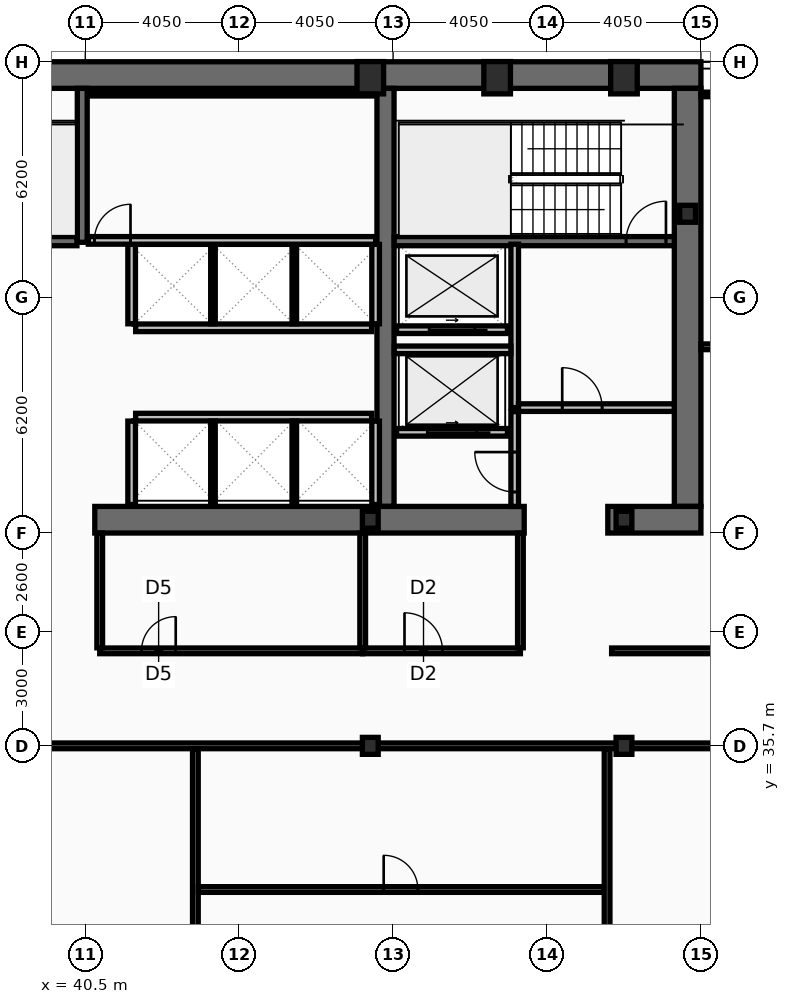
"""IFC4 building model, lengths in metres.
Left out: names, types, materials, properties, quantities, classifications, styles, units other than length and angle.
Written with IfcOpenShell. Run it as: python <this file> out.ifc"""

import sys

from ifc_helpers import new_model, si_unit, direction, frame, frame_2d, origin, origin_2d, place, context, subcontext, project, spatial, rectangle, hollow_rectangle, i_section, extrude, element, fill, save


model = new_model("IFC4")
c1 = context("Model", 3, precision=1e-05, world=origin(), true_north=direction((0.0, 1.0)))
c2 = subcontext(c1, "Body", "Model", "MODEL_VIEW")
j1 = project(units=[si_unit("LENGTHUNIT", "METRE"), si_unit("PLANEANGLEUNIT", "RADIAN")], contexts=[c1])
p1 = place(None, origin())
s1 = spatial("IfcSite", under=j1, at=p1, CompositionType="ELEMENT")
p2 = place(p1, origin())
s2 = spatial("IfcBuilding", under=s1, at=p2, CompositionType="ELEMENT")
p3 = place(p2, frame((0.0, 0.0, 143.4)))
s3 = spatial("IfcBuildingStorey", under=s2, at=p3, CompositionType="ELEMENT", Elevation=143.4)
p4 = place(p3, frame((16.2, 53.35, 0.0), z_axis=(0.0, 0.0, 1.0), x_axis=(1.0, 0.0, 0.0)))
e1 = element("IfcWall", 1, at=p4, inside=s3, PredefinedType="SHEAR", context=c2, shape_type="SweptSolid", body=[
    extrude(rectangle(XDim=40.5, YDim=0.7, at=frame_2d((20.25, 0.0))), origin(), (0.0, 0.0, 1.0), 3.44),
])
p5 = place(p3, frame((56.35, 53.0, 0.0), z_axis=(0.0, 0.0, 1.0), x_axis=(0.0, -1.0, 0.0)))
e2 = element("IfcWall", 2, at=p5, inside=s3, PredefinedType="SHEAR", context=c2, shape_type="SweptSolid", body=[
    extrude(rectangle(XDim=11.0, YDim=0.7, at=frame_2d((5.5, 0.0))), origin(), (0.0, 0.0, 1.0), 3.44),
])
p6 = place(p3, frame((48.4, 42.0, 0.0), z_axis=(0.0, 0.0, 1.0), x_axis=(0.0, 1.0, 0.0)))
e3 = element("IfcWall", 3, at=p6, inside=s3, PredefinedType="SHEAR", context=c2, shape_type="SweptSolid", body=[
    extrude(rectangle(XDim=11.0, YDim=0.45, at=frame_2d((5.5, 0.0))), origin(), (0.0, 0.0, 1.0), 3.44),
])
p7 = place(p3, frame((52.05, 41.65, 0.0), z_axis=(0.0, 0.0, 1.0), x_axis=(-1.0, 0.0, 0.0)))
e4 = element("IfcWall", 4, at=p7, inside=s3, PredefinedType="SHEAR", context=c2, shape_type="SweptSolid", body=[
    extrude(rectangle(XDim=11.3, YDim=0.7, at=frame_2d((5.65, 0.0))), origin(), (0.0, 0.0, 1.0), 3.44),
])
p8 = place(p3, frame((56.7, 41.65, 0.0), z_axis=(0.0, 0.0, 1.0), x_axis=(-1.0, 0.0, 0.0)))
e5 = element("IfcWall", 5, at=p8, inside=s3, PredefinedType="SHEAR", context=c2, shape_type="SweptSolid", body=[
    extrude(rectangle(XDim=2.45, YDim=0.7, at=frame_2d((1.225, 0.0))), origin(), (0.0, 0.0, 1.0), 3.44),
])
p9 = place(p3, frame((40.42, 48.95, 0.0), z_axis=(0.0, 0.0, 1.0), x_axis=(0.0, 1.0, 0.0)))
e6 = element("IfcWall", 6, at=p9, inside=s3, PredefinedType="SHEAR", context=c2, shape_type="SweptSolid", body=[
    extrude(rectangle(XDim=4.05, YDim=0.26, at=frame_2d((2.025, 0.0))), origin(), (0.0, 0.0, 1.0), 3.44),
])
p10 = place(p3, frame((48.63, 48.98, 0.0), z_axis=(0.0, 0.0, 1.0), x_axis=(1.0, 0.0, 0.0)))
e7 = element("IfcWall", 7, at=p10, inside=s3, PredefinedType="SHEAR", context=c2, shape_type="SweptSolid", body=[
    extrude(rectangle(XDim=7.37, YDim=0.24, at=frame_2d((3.685, 0.0))), origin(), (0.0, 0.0, 1.0), 3.44),
])
p11 = place(p10, frame((6.1, 0.0, 0.0)))
e8 = element("IfcOpeningElement", 8, at=p11, cuts=e7, PredefinedType="OPENING", context=c2, shape_type="SweptSolid", body=[
    extrude(rectangle(XDim=1.05, YDim=2.15, at=frame_2d((0.525, 1.075))), frame((0.0, 0.13, 0.0), z_axis=(0.0, -1.0, 0.0), x_axis=(1.0, 0.0, 0.0)), (0.0, 0.0, 1.0), 0.26),
])
p12 = place(p3, frame((32.72, 48.98, 0.0), z_axis=(0.0, 0.0, 1.0), x_axis=(1.0, 0.0, 0.0)))
e9 = element("IfcWall", 9, at=p12, inside=s3, PredefinedType="SHEAR", context=c2, shape_type="SweptSolid", body=[
    extrude(rectangle(XDim=7.56, YDim=0.24, at=frame_2d((3.78, 0.0))), origin(), (0.0, 0.0, 1.0), 3.44),
])
p13 = place(p12, frame((0.22, 0.0, 0.0)))
e10 = element("IfcOpeningElement", 10, at=p13, cuts=e9, PredefinedType="OPENING", context=c2, shape_type="SweptSolid", body=[
    extrude(rectangle(XDim=1.05, YDim=2.15, at=frame_2d((0.525, 1.075))), frame((0.0, 0.13, 0.0), z_axis=(0.0, -1.0, 0.0), x_axis=(1.0, 0.0, 0.0)), (0.0, 0.0, 1.0), 0.26),
])
for number, where, z_axis, x_axis in (
    (11, (48.0, 53.28, 0.0), (0.0, 0.0, 1.0), (1.0, 0.0, 0.0)),
    (12, (51.337, 53.28, 0.0), (0.0, 0.0, 1.0), (1.0, 0.0, 0.0)),
    (13, (54.675, 53.28, 0.0), (0.0, 0.0, 1.0), (1.0, 0.0, 0.0)),
):
    element("IfcColumn", number, at=place(p3, frame(where, z_axis=z_axis, x_axis=x_axis)), inside=s3, PredefinedType="COLUMN", context=c2, shape_type="SweptSolid", body=[
        extrude(hollow_rectangle(XDim=0.7, YDim=0.85, WallThickness=0.05, at=origin_2d()), origin(), (0.0, 0.0, 1.0), 3.6),
    ])
for number, where, z_axis, x_axis in (
    (14, (56.35, 49.7, 0.0), (0.0, 0.0, 1.0), (1.0, 0.0, 0.0)),
    (15, (48.0, 35.7, 0.0), (0.0, 0.0, 1.0), (1.0, 0.0, 0.0)),
    (16, (48.0, 41.65, 0.0), (0.0, 0.0, 1.0), (1.0, 0.0, 0.0)),
    (17, (54.675, 35.7, 0.0), (0.0, 0.0, 1.0), (1.0, 0.0, 0.0)),
    (18, (54.675, 41.65, 0.0), (0.0, 0.0, 1.0), (1.0, 0.0, 0.0)),
):
    element("IfcColumn", number, at=place(p3, frame(where, z_axis=z_axis, x_axis=x_axis)), inside=s3, PredefinedType="COLUMN", context=c2, shape_type="SweptSolid", body=[
        extrude(i_section(OverallWidth=0.416, OverallDepth=0.446, WebThickness=0.039, FlangeThickness=0.063, at=origin_2d()), origin(), (0.0, 0.0, 1.0), 3.6),
    ])
p14 = place(p3, frame((51.61, 43.95, 0.0), z_axis=(0.0, 0.0, 1.0), x_axis=(-1.0, 0.0, 0.0)))
e19 = element("IfcWall", 19, at=p14, inside=s3, PredefinedType="PARTITIONING", context=c2, shape_type="SweptSolid", body=[
    extrude(rectangle(XDim=2.92, YDim=0.2, at=frame_2d((1.46, 0.0))), origin(), (0.0, 0.0, 1.0), 3.44),
])
p15 = place(p14, frame((0.81, 0.0, 0.0)))
e20 = element("IfcOpeningElement", 20, at=p15, cuts=e19, PredefinedType="OPENING", context=c2, shape_type="SweptSolid", body=[
    extrude(rectangle(XDim=1.3, YDim=2.18, at=frame_2d((0.65, 1.09))), frame((0.0, 0.11, 0.0), z_axis=(0.0, -1.0, 0.0), x_axis=(1.0, 0.0, 0.0)), (0.0, 0.0, 1.0), 0.22),
])
p16 = place(p3, frame((51.61, 46.65, 0.0), z_axis=(0.0, 0.0, 1.0), x_axis=(-1.0, 0.0, 0.0)))
e21 = element("IfcWall", 21, at=p16, inside=s3, PredefinedType="PARTITIONING", context=c2, shape_type="SweptSolid", body=[
    extrude(rectangle(XDim=2.92, YDim=0.2, at=frame_2d((1.46, 0.0))), origin(), (0.0, 0.0, 1.0), 3.44),
])
p17 = place(p16, frame((0.86, 0.0, 0.0)))
e22 = element("IfcOpeningElement", 22, at=p17, cuts=e21, PredefinedType="OPENING", context=c2, shape_type="SweptSolid", body=[
    extrude(rectangle(XDim=1.2, YDim=2.18, at=frame_2d((0.6, 1.09))), frame((0.0, 0.11, 0.0), z_axis=(0.0, -1.0, 0.0), x_axis=(1.0, 0.0, 0.0)), (0.0, 0.0, 1.0), 0.22),
])
p18 = place(p3, frame((51.8, 44.6, 0.0), z_axis=(0.0, 0.0, 1.0), x_axis=(0.0, 1.0, 0.0)))
e23 = element("IfcWall", 23, at=p18, inside=s3, PredefinedType="PARTITIONING", context=c2, shape_type="SweptSolid", body=[
    extrude(rectangle(XDim=4.3, YDim=0.2, at=frame_2d((2.15, 0.0))), origin(), (0.0, 0.0, 1.0), 3.44),
])
p19 = place(p3, frame((51.9, 44.6, 0.0), z_axis=(0.0, 0.0, 1.0), x_axis=(1.0, 0.0, 0.0)))
e24 = element("IfcWall", 24, at=p19, inside=s3, PredefinedType="PARTITIONING", context=c2, shape_type="SweptSolid", body=[
    extrude(rectangle(XDim=4.1, YDim=0.2, at=frame_2d((2.05, 0.0))), origin(), (0.0, 0.0, 1.0), 3.44),
])
p20 = place(p19, frame((1.15, 0.0, 0.0)))
e25 = element("IfcOpeningElement", 25, at=p20, cuts=e24, PredefinedType="OPENING", context=c2, shape_type="SweptSolid", body=[
    extrude(rectangle(XDim=1.05, YDim=2.15, at=frame_2d((0.525, 1.075))), frame((0.0, 0.11, 0.0), z_axis=(0.0, -1.0, 0.0), x_axis=(1.0, 0.0, 0.0)), (0.0, 0.0, 1.0), 0.22),
])
p21 = place(p3, frame((48.63, 46.12, 0.0), z_axis=(0.0, 0.0, 1.0), x_axis=(1.0, 0.0, 0.0)))
e26 = element("IfcWall", 26, at=p21, inside=s3, PredefinedType="PARTITIONING", context=c2, shape_type="SweptSolid", body=[
    extrude(rectangle(XDim=3.07, YDim=0.2, at=frame_2d((1.535, 0.0))), origin(), (0.0, 0.0, 1.0), 3.44),
])
p22 = place(p3, frame((51.8, 42.0, 0.0), z_axis=(0.0, 0.0, 1.0), x_axis=(0.0, 1.0, 0.0)))
e27 = element("IfcWall", 27, at=p22, inside=s3, PredefinedType="PARTITIONING", context=c2, shape_type="SweptSolid", body=[
    extrude(rectangle(XDim=2.495, YDim=0.2, at=frame_2d((1.248, 0.0))), origin(), (0.0, 0.0, 1.0), 3.44),
])
p23 = place(p22, frame((0.38, 0.0, 0.0)))
e28 = element("IfcOpeningElement", 28, at=p23, cuts=e27, PredefinedType="OPENING", context=c2, shape_type="SweptSolid", body=[
    extrude(rectangle(XDim=1.05, YDim=2.15, at=frame_2d((0.525, 1.075))), frame((0.0, 0.11, 0.0), z_axis=(0.0, -1.0, 0.0), x_axis=(1.0, 0.0, 0.0)), (0.0, 0.0, 1.0), 0.22),
])
p24 = place(p3, frame((41.825, 46.7, 0.0), z_axis=(0.0, 0.0, 1.0), x_axis=(1.0, 0.0, 0.0)))
e29 = element("IfcWall", 29, at=p24, inside=s3, PredefinedType="PARTITIONING", context=c2, shape_type="SweptSolid", body=[
    extrude(rectangle(XDim=6.21, YDim=0.2, at=frame_2d((3.105, 0.0))), origin(), (0.0, 0.0, 1.0), 3.44),
])
for number, where, z_axis, x_axis in (
    (30, (41.72, 46.805, 0.0), (0.0, 0.0, 1.0), (0.0, 1.0, 0.0)),
    (31, (48.14, 46.805, 0.0), (0.0, 0.0, 1.0), (0.0, 1.0, 0.0)),
):
    element("IfcWall", number, at=place(p3, frame(where, z_axis=z_axis, x_axis=x_axis)), inside=s3, PredefinedType="PARTITIONING", context=c2, shape_type="SweptSolid", body=[
        extrude(rectangle(XDim=2.09, YDim=0.2, at=frame_2d((1.045, 0.0))), origin(), (0.0, 0.0, 1.0), 3.44),
    ])
for number, where, z_axis, x_axis in (
    (32, (43.86, 46.805, 0.0), (0.0, 0.0, 1.0), (0.0, 1.0, 0.0)),
    (33, (46.0, 46.805, 0.0), (0.0, 0.0, 1.0), (0.0, 1.0, 0.0)),
):
    element("IfcWall", number, at=place(p3, frame(where, z_axis=z_axis, x_axis=x_axis)), inside=s3, PredefinedType="PARTITIONING", context=c2, shape_type="SweptSolid", body=[
        extrude(rectangle(XDim=2.09, YDim=0.12, at=frame_2d((1.045, 0.0))), origin(), (0.0, 0.0, 1.0), 3.44),
    ])
p25 = place(p3, frame((41.825, 44.35, 0.0), z_axis=(0.0, 0.0, 1.0), x_axis=(1.0, 0.0, 0.0)))
e34 = element("IfcWall", 34, at=p25, inside=s3, PredefinedType="PARTITIONING", context=c2, shape_type="SweptSolid", body=[
    extrude(rectangle(XDim=6.21, YDim=0.2, at=frame_2d((3.105, 0.0))), origin(), (0.0, 0.0, 1.0), 3.44),
])
for number, where, z_axis, x_axis in (
    (35, (41.72, 42.05, 0.0), (0.0, 0.0, 1.0), (0.0, 1.0, 0.0)),
    (36, (48.14, 42.05, 0.0), (0.0, 0.0, 1.0), (0.0, 1.0, 0.0)),
):
    element("IfcWall", number, at=place(p3, frame(where, z_axis=z_axis, x_axis=x_axis)), inside=s3, PredefinedType="PARTITIONING", context=c2, shape_type="SweptSolid", body=[
        extrude(rectangle(XDim=2.195, YDim=0.2, at=frame_2d((1.098, 0.0))), origin(), (0.0, 0.0, 1.0), 3.44),
    ])
for number, where, z_axis, x_axis in (
    (37, (43.86, 42.05, 0.0), (0.0, 0.0, 1.0), (0.0, 1.0, 0.0)),
    (38, (46.0, 42.05, 0.0), (0.0, 0.0, 1.0), (0.0, 1.0, 0.0)),
):
    element("IfcWall", number, at=place(p3, frame(where, z_axis=z_axis, x_axis=x_axis)), inside=s3, PredefinedType="PARTITIONING", context=c2, shape_type="SweptSolid", body=[
        extrude(rectangle(XDim=2.195, YDim=0.12, at=frame_2d((1.098, 0.0))), origin(), (0.0, 0.0, 1.0), 3.44),
    ])
p26 = place(p3, frame((40.58, 52.86, 0.0), z_axis=(0.0, 0.0, 1.0), x_axis=(1.0, 0.0, 0.0)))
e39 = element("IfcWall", 39, at=p26, inside=s3, PredefinedType="PARTITIONING", context=c2, shape_type="SweptSolid", body=[
    extrude(rectangle(XDim=7.56, YDim=0.12, at=frame_2d((3.78, 0.0))), origin(), (0.0, 0.0, 1.0), 3.44),
])
p27 = place(p3, frame((40.58, 49.0, 0.0), z_axis=(0.0, 0.0, 1.0), x_axis=(1.0, 0.0, 0.0)))
e40 = element("IfcWall", 40, at=p27, inside=s3, PredefinedType="PARTITIONING", context=c2, shape_type="SweptSolid", body=[
    extrude(rectangle(XDim=7.56, YDim=0.2, at=frame_2d((3.78, 0.0))), origin(), (0.0, 0.0, 1.0), 3.44),
])
p28 = place(p27, frame((0.16, 0.0, 0.0)))
e41 = element("IfcOpeningElement", 41, at=p28, cuts=e40, PredefinedType="OPENING", context=c2, shape_type="SweptSolid", body=[
    extrude(rectangle(XDim=0.95, YDim=2.1, at=frame_2d((0.475, 1.05))), frame((0.0, 0.11, 0.0), z_axis=(0.0, -1.0, 0.0), x_axis=(1.0, 0.0, 0.0)), (0.0, 0.0, 1.0), 0.22),
])
p29 = place(p3, frame((40.88, 38.2, 0.0), z_axis=(0.0, 0.0, 1.0), x_axis=(1.0, 0.0, 0.0)))
e42 = element("IfcWall", 42, at=p29, inside=s3, PredefinedType="PARTITIONING", context=c2, shape_type="SweptSolid", body=[
    extrude(rectangle(XDim=6.92, YDim=0.15, at=frame_2d((3.46, 0.0))), origin(), (0.0, 0.0, 1.0), 2.73),
])
p30 = place(p29, frame((1.1, 0.0, 0.0)))
e43 = element("IfcOpeningElement", 43, at=p30, cuts=e42, PredefinedType="OPENING", context=c2, shape_type="SweptSolid", body=[
    extrude(rectangle(XDim=0.9, YDim=2.05, at=frame_2d((0.45, 1.025))), frame((0.0, 0.085, 0.0), z_axis=(0.0, -1.0, 0.0), x_axis=(1.0, 0.0, 0.0)), (0.0, 0.0, 1.0), 0.17),
])
p31 = place(p3, frame((47.8, 38.2, 0.0), z_axis=(0.0, 0.0, 1.0), x_axis=(1.0, 0.0, 0.0)))
e44 = element("IfcWall", 44, at=p31, inside=s3, PredefinedType="PARTITIONING", context=c2, shape_type="SweptSolid", body=[
    extrude(rectangle(XDim=4.15, YDim=0.15, at=frame_2d((2.075, 0.0))), origin(), (0.0, 0.0, 1.0), 2.73),
])
p32 = place(p31, frame((1.1, 0.0, 0.0)))
e45 = element("IfcOpeningElement", 45, at=p32, cuts=e44, PredefinedType="OPENING", context=c2, shape_type="SweptSolid", body=[
    extrude(rectangle(XDim=1.0, YDim=2.05, at=frame_2d((0.5, 1.025))), frame((0.0, 0.085, 0.0), z_axis=(0.0, -1.0, 0.0), x_axis=(1.0, 0.0, 0.0)), (0.0, 0.0, 1.0), 0.17),
])
p33 = place(p3, frame((40.88, 38.28, 0.0), z_axis=(0.0, 0.0, 1.0), x_axis=(0.0, 1.0, 0.0)))
e46 = element("IfcWall", 46, at=p33, inside=s3, PredefinedType="PARTITIONING", context=c2, shape_type="SweptSolid", body=[
    extrude(rectangle(XDim=3.02, YDim=0.15, at=frame_2d((1.51, 0.0))), origin(), (0.0, 0.0, 1.0), 3.44),
])
p34 = place(p3, frame((47.8, 38.28, 0.0), z_axis=(0.0, 0.0, 1.0), x_axis=(0.0, 1.0, 0.0)))
e47 = element("IfcWall", 47, at=p34, inside=s3, PredefinedType="PARTITIONING", context=c2, shape_type="SweptSolid", body=[
    extrude(rectangle(XDim=3.02, YDim=0.15, at=frame_2d((1.51, 0.0))), origin(), (0.0, 0.0, 1.0), 2.73),
])
p35 = place(p3, frame((51.95, 38.28, 0.0), z_axis=(0.0, 0.0, 1.0), x_axis=(0.0, 1.0, 0.0)))
e48 = element("IfcWall", 48, at=p35, inside=s3, PredefinedType="PARTITIONING", context=c2, shape_type="SweptSolid", body=[
    extrude(rectangle(XDim=3.02, YDim=0.15, at=frame_2d((1.51, 0.0))), origin(), (0.0, 0.0, 1.0), 3.44),
])
p36 = place(p3, frame((54.35, 38.2, 0.0), z_axis=(0.0, 0.0, 1.0), x_axis=(1.0, 0.0, 0.0)))
e49 = element("IfcWall", 49, at=p36, inside=s3, PredefinedType="PARTITIONING", context=c2, shape_type="SweptSolid", body=[
    extrude(rectangle(XDim=12.52, YDim=0.15, at=frame_2d((6.26, 0.0))), origin(), (0.0, 0.0, 1.0), 2.73),
])
p37 = place(p36, frame((3.25, 0.0, 0.0)))
e50 = element("IfcOpeningElement", 50, at=p37, cuts=e49, PredefinedType="OPENING", context=c2, shape_type="SweptSolid", body=[
    extrude(rectangle(XDim=0.95, YDim=2.05, at=frame_2d((0.475, 1.025))), frame((0.0, 0.085, 0.0), z_axis=(0.0, -1.0, 0.0), x_axis=(1.0, 0.0, 0.0)), (0.0, 0.0, 1.0), 0.17),
])
p38 = place(p3, frame((56.7, 46.2, 0.0), z_axis=(0.0, 0.0, 1.0), x_axis=(1.0, 0.0, 0.0)))
e51 = element("IfcWall", 51, at=p38, inside=s3, PredefinedType="PARTITIONING", context=c2, shape_type="SweptSolid", body=[
    extrude(rectangle(XDim=10.105, YDim=0.15, at=frame_2d((5.052, 0.0))), origin(), (0.0, 0.0, 1.0), 2.83),
])
p39 = place(p38, frame((0.9, 0.0, 0.0)))
e52 = element("IfcOpeningElement", 52, at=p39, cuts=e51, PredefinedType="OPENING", context=c2, shape_type="SweptSolid", body=[
    extrude(rectangle(XDim=0.9, YDim=2.05, at=frame_2d((0.45, 1.025))), frame((0.0, 0.085, 0.0), z_axis=(0.0, -1.0, 0.0), x_axis=(1.0, 0.0, 0.0)), (0.0, 0.0, 1.0), 0.17),
])
p40 = place(p3, frame((21.81, 35.7, 0.0), z_axis=(0.0, 0.0, 1.0), x_axis=(1.0, 0.0, 0.0)))
e53 = element("IfcWall", 53, at=p40, inside=s3, PredefinedType="PARTITIONING", context=c2, shape_type="SweptSolid", body=[
    extrude(rectangle(XDim=44.995, YDim=0.15, at=frame_2d((22.498, 0.0))), origin(), (0.0, 0.0, 1.0), 2.73),
])
p41 = place(p3, frame((43.397, 26.785, 0.0), z_axis=(0.0, 0.0, 1.0), x_axis=(0.0, 1.0, 0.0)))
e54 = element("IfcWall", 54, at=p41, inside=s3, PredefinedType="PARTITIONING", context=c2, shape_type="SweptSolid", body=[
    extrude(rectangle(XDim=8.835, YDim=0.15, at=frame_2d((4.417, 0.0))), origin(), (0.0, 0.0, 1.0), 2.93),
])
p42 = place(p3, frame((43.477, 31.92, 0.0), z_axis=(0.0, 0.0, 1.0), x_axis=(1.0, 0.0, 0.0)))
e55 = element("IfcWall", 55, at=p42, inside=s3, PredefinedType="PARTITIONING", context=c2, shape_type="SweptSolid", body=[
    extrude(rectangle(XDim=10.674, YDim=0.15, at=frame_2d((5.337, 0.0))), origin(), (0.0, 0.0, 1.0), 2.73),
])
p43 = place(p42, frame((4.875, 0.0, 0.0)))
e56 = element("IfcOpeningElement", 56, at=p43, cuts=e55, PredefinedType="OPENING", context=c2, shape_type="SweptSolid", body=[
    extrude(rectangle(XDim=0.9, YDim=2.05, at=frame_2d((0.45, 1.025))), frame((0.0, 0.085, 0.0), z_axis=(0.0, -1.0, 0.0), x_axis=(1.0, 0.0, 0.0)), (0.0, 0.0, 1.0), 0.17),
])
p44 = place(p3, frame((54.231, 26.785, 0.0), z_axis=(0.0, 0.0, 1.0), x_axis=(0.0, 1.0, 0.0)))
e57 = element("IfcWall", 57, at=p44, inside=s3, PredefinedType="PARTITIONING", context=c2, shape_type="SweptSolid", body=[
    extrude(rectangle(XDim=8.835, YDim=0.15, at=frame_2d((4.417, 0.0))), origin(), (0.0, 0.0, 1.0), 2.73),
])
p45 = place(p3, frame((56.7, 52.84, 0.0), z_axis=(0.0, 0.0, 1.0), x_axis=(1.0, 0.0, 0.0)))
e58 = element("IfcWall", 58, at=p45, inside=s3, PredefinedType="PARTITIONING", context=c2, shape_type="SweptSolid", body=[
    extrude(rectangle(XDim=10.105, YDim=0.12, at=frame_2d((5.052, 0.0))), origin(), (0.0, 0.0, 1.0), 3.44),
])
p46 = place(p11, origin())
e59 = element("IfcDoor", 59, at=p46, inside=s3, OperationType="SINGLE_SWING_RIGHT", PredefinedType="DOOR", context=c2, shape_type="SweptSolid", body=[
    extrude(rectangle(XDim=1.05, YDim=2.15, at=frame_2d((0.525, 1.075))), frame((0.0, 0.025, 0.0), z_axis=(0.0, -1.0, 0.0), x_axis=(1.0, 0.0, 0.0)), (0.0, 0.0, 1.0), 0.05),
])
fill(e8, e59)
p47 = place(p15, origin())
e60 = element("IfcDoor", 60, at=p47, inside=s3, OperationType="SLIDING_TO_LEFT", PredefinedType="DOOR", context=c2, shape_type="SweptSolid", body=[
    extrude(rectangle(XDim=1.3, YDim=2.18, at=frame_2d((0.65, 1.09))), frame((0.0, 0.025, 0.0), z_axis=(0.0, -1.0, 0.0), x_axis=(1.0, 0.0, 0.0)), (0.0, 0.0, 1.0), 0.05),
])
fill(e20, e60)
p48 = place(p17, origin())
e61 = element("IfcDoor", 61, at=p48, inside=s3, OperationType="SLIDING_TO_LEFT", PredefinedType="DOOR", context=c2, shape_type="SweptSolid", body=[
    extrude(rectangle(XDim=1.2, YDim=2.18, at=frame_2d((0.6, 1.09))), frame((0.0, 0.025, 0.0), z_axis=(0.0, -1.0, 0.0), x_axis=(1.0, 0.0, 0.0)), (0.0, 0.0, 1.0), 0.05),
])
fill(e22, e61)
p49 = place(p20, origin())
e62 = element("IfcDoor", 62, at=p49, inside=s3, OperationType="SINGLE_SWING_LEFT", PredefinedType="DOOR", context=c2, shape_type="SweptSolid", body=[
    extrude(rectangle(XDim=1.05, YDim=2.15, at=frame_2d((0.525, 1.075))), frame((0.0, 0.025, 0.0), z_axis=(0.0, -1.0, 0.0), x_axis=(1.0, 0.0, 0.0)), (0.0, 0.0, 1.0), 0.05),
])
fill(e25, e62)
p50 = place(p23, origin())
e63 = element("IfcDoor", 63, at=p50, inside=s3, OperationType="SINGLE_SWING_RIGHT", PredefinedType="DOOR", context=c2, shape_type="SweptSolid", body=[
    extrude(rectangle(XDim=1.05, YDim=2.15, at=frame_2d((0.525, 1.075))), frame((0.0, 0.025, 0.0), z_axis=(0.0, -1.0, 0.0), x_axis=(1.0, 0.0, 0.0)), (0.0, 0.0, 1.0), 0.05),
])
fill(e28, e63)
p51 = place(p28, origin())
e64 = element("IfcDoor", 64, at=p51, inside=s3, OperationType="SINGLE_SWING_RIGHT", PredefinedType="DOOR", context=c2, shape_type="SweptSolid", body=[
    extrude(rectangle(XDim=0.95, YDim=2.1, at=frame_2d((0.475, 1.05))), frame((0.0, 0.025, 0.0), z_axis=(0.0, -1.0, 0.0), x_axis=(1.0, 0.0, 0.0)), (0.0, 0.0, 1.0), 0.05),
])
fill(e41, e64)
p52 = place(p30, origin())
e65 = element("IfcDoor", 65, at=p52, inside=s3, OperationType="SINGLE_SWING_RIGHT", PredefinedType="DOOR", context=c2, shape_type="SweptSolid", body=[
    extrude(rectangle(XDim=0.9, YDim=2.05, at=frame_2d((0.45, 1.025))), frame((0.0, 0.025, 0.0), z_axis=(0.0, -1.0, 0.0), x_axis=(1.0, 0.0, 0.0)), (0.0, 0.0, 1.0), 0.05),
])
fill(e43, e65)
p53 = place(p32, origin())
e66 = element("IfcDoor", 66, at=p53, inside=s3, OperationType="SINGLE_SWING_LEFT", PredefinedType="DOOR", context=c2, shape_type="SweptSolid", body=[
    extrude(rectangle(XDim=1.0, YDim=2.05, at=frame_2d((0.5, 1.025))), frame((0.0, 0.025, 0.0), z_axis=(0.0, -1.0, 0.0), x_axis=(1.0, 0.0, 0.0)), (0.0, 0.0, 1.0), 0.05),
])
fill(e45, e66)
p54 = place(p43, origin())
e67 = element("IfcDoor", 67, at=p54, inside=s3, OperationType="SINGLE_SWING_LEFT", PredefinedType="DOOR", context=c2, shape_type="SweptSolid", body=[
    extrude(rectangle(XDim=0.9, YDim=2.05, at=frame_2d((0.45, 1.025))), frame((0.0, 0.025, 0.0), z_axis=(0.0, -1.0, 0.0), x_axis=(1.0, 0.0, 0.0)), (0.0, 0.0, 1.0), 0.05),
])
fill(e56, e67)
save(model, sys.argv[1])
